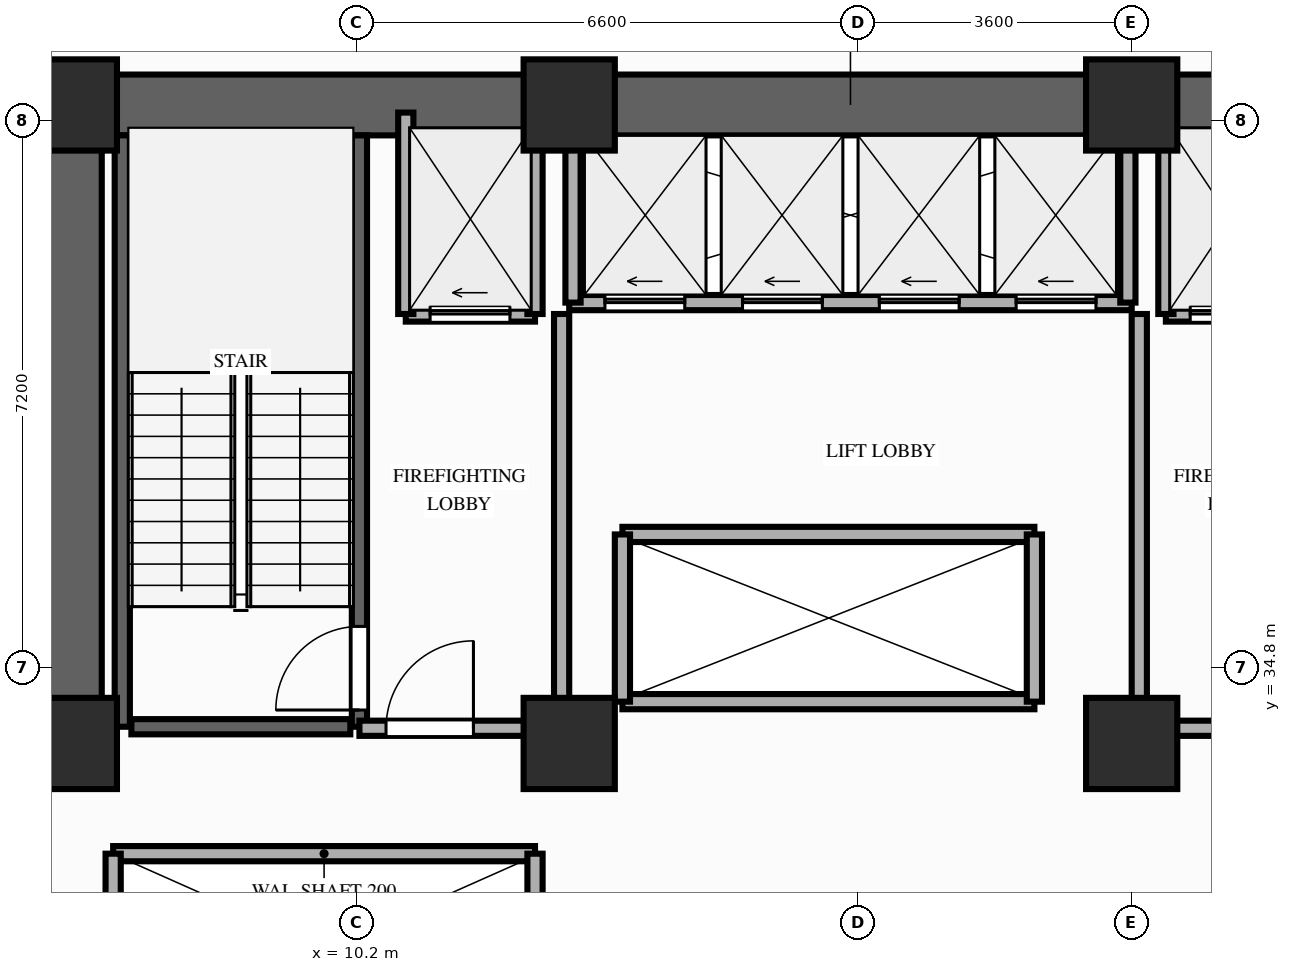
"""IFC4 building model, lengths in metres.
Left out: names, types, materials, properties, quantities, classifications, styles, units other than length and angle.
Written with IfcOpenShell. Run it as: python <this file> out.ifc"""

import sys

from ifc_helpers import new_model, si_unit, direction, frame, frame_2d, origin, origin_2d, place, context, subcontext, project, spatial, rectangle, extrude, element, fill, save


model = new_model("IFC4")
c1 = context("Model", 3, precision=1e-05, world=origin(), true_north=direction((0.0, 1.0)))
c2 = subcontext(c1, "Body", "Model", "MODEL_VIEW")
j1 = project(units=[si_unit("LENGTHUNIT", "METRE"), si_unit("PLANEANGLEUNIT", "RADIAN")], contexts=[c1])
p1 = place(None, origin())
s1 = spatial("IfcSite", under=j1, at=p1, CompositionType="ELEMENT")
p2 = place(p1, origin())
s2 = spatial("IfcBuilding", under=s1, at=p2, CompositionType="ELEMENT")
p3 = place(p2, frame((0.0, 0.0, 4.6)))
s3 = spatial("IfcBuildingStorey", under=s2, at=p3, CompositionType="ELEMENT", Elevation=4.6)
for number, where, z_axis, x_axis in (
    (1, (6.45, 33.8, 0.0), (0.0, 0.0, 1.0), (1.0, 0.0, 0.0)),
    (2, (13.0, 33.8, 0.0), (0.0, 0.0, 1.0), (1.0, 0.0, 0.0)),
    (3, (20.4, 33.8, 0.0), (0.0, 0.0, 1.0), (1.0, 0.0, 0.0)),
    (4, (6.45, 42.2, 0.0), (0.0, 0.0, 1.0), (1.0, 0.0, 0.0)),
    (5, (13.0, 42.2, 0.0), (0.0, 0.0, 1.0), (1.0, 0.0, 0.0)),
    (6, (20.4, 42.2, 0.0), (0.0, 0.0, 1.0), (1.0, 0.0, 0.0)),
):
    element("IfcColumn", number, at=place(p3, frame(where, z_axis=z_axis, x_axis=x_axis)), inside=s3, PredefinedType="COLUMN", context=c2, shape_type="SweptSolid", body=[
        extrude(rectangle(XDim=1.2, YDim=1.2, at=origin_2d()), origin(), (0.0, 0.0, 1.0), 4.2),
    ])
p4 = place(p3, frame((6.45, 42.2, 0.0), z_axis=(0.0, 0.0, 1.0), x_axis=(1.0, 0.0, 0.0)))
e7 = element("IfcWall", 7, at=p4, inside=s3, PredefinedType="SHEAR", context=c2, shape_type="SweptSolid", body=[
    extrude(rectangle(XDim=20.45, YDim=0.8, at=frame_2d((10.225, 0.0))), origin(), (0.0, 0.0, 1.0), 3.95),
])
p5 = place(p3, frame((6.45, 33.8, 0.0), z_axis=(0.0, 0.0, 1.0), x_axis=(0.0, 1.0, 0.0)))
e8 = element("IfcWall", 8, at=p5, inside=s3, PredefinedType="SHEAR", context=c2, shape_type="SweptSolid", body=[
    extrude(rectangle(XDim=7.95, YDim=0.8, at=frame_2d((3.975, 0.0))), origin(), (0.0, 0.0, 1.0), 3.95),
])
p6 = place(p3, frame((7.12, 34.02, 0.0), z_axis=(0.0, 0.0, 1.0), x_axis=(0.0, 1.0, 0.0)))
e9 = element("IfcWall", 9, at=p6, inside=s3, PredefinedType="SHEAR", context=c2, shape_type="SweptSolid", body=[
    extrude(rectangle(XDim=7.78, YDim=0.2, at=frame_2d((3.89, 0.0))), origin(), (0.0, 0.0, 1.0), 3.95),
])
p7 = place(p3, frame((10.24, 34.02, 0.0), z_axis=(0.0, 0.0, 1.0), x_axis=(0.0, 1.0, 0.0)))
e10 = element("IfcWall", 10, at=p7, inside=s3, PredefinedType="SHEAR", context=c2, shape_type="SweptSolid", body=[
    extrude(rectangle(XDim=7.78, YDim=0.2, at=frame_2d((3.89, 0.0))), origin(), (0.0, 0.0, 1.0), 3.95),
])
p8 = place(p7, frame((0.22, 0.0, 0.0)))
e11 = element("IfcOpeningElement", 11, at=p8, cuts=e10, PredefinedType="OPENING", context=c2, shape_type="SweptSolid", body=[
    extrude(rectangle(XDim=1.1, YDim=2.15, at=frame_2d((0.55, 1.075))), frame((0.0, 0.11, 0.0), z_axis=(0.0, -1.0, 0.0), x_axis=(1.0, 0.0, 0.0)), (0.0, 0.0, 1.0), 0.22),
])
p9 = place(p3, frame((7.24, 34.02, 0.0), z_axis=(0.0, 0.0, 1.0), x_axis=(1.0, 0.0, 0.0)))
e12 = element("IfcWall", 12, at=p9, inside=s3, PredefinedType="SHEAR", context=c2, shape_type="SweptSolid", body=[
    extrude(rectangle(XDim=2.88, YDim=0.2, at=frame_2d((1.44, 0.0))), origin(), (0.0, 0.0, 1.0), 3.95),
])
p10 = place(p3, frame((7.0, 32.35, 0.0), z_axis=(0.0, 0.0, 1.0), x_axis=(1.0, 0.0, 0.0)))
e13 = element("IfcWall", 13, at=p10, inside=s3, PredefinedType="MOVABLE", context=c2, shape_type="SweptSolid", body=[
    extrude(rectangle(XDim=5.55, YDim=0.2, at=frame_2d((2.775, 0.0))), origin(), (0.0, 0.0, 1.0), 3.95),
])
for number, where, z_axis, x_axis in (
    (14, (7.0, 29.85, 0.0), (0.0, 0.0, 1.0), (0.0, 1.0, 0.0)),
    (15, (12.55, 29.85, 0.0), (0.0, 0.0, 1.0), (0.0, 1.0, 0.0)),
):
    element("IfcWall", number, at=place(p3, frame(where, z_axis=z_axis, x_axis=x_axis)), inside=s3, PredefinedType="MOVABLE", context=c2, shape_type="SweptSolid", body=[
        extrude(rectangle(XDim=2.5, YDim=0.2, at=frame_2d((1.25, 0.0))), origin(), (0.0, 0.0, 1.0), 3.95),
    ])
p11 = place(p3, frame((10.85, 39.45, 0.0), z_axis=(0.0, 0.0, 1.0), x_axis=(1.0, 0.0, 0.0)))
e16 = element("IfcWall", 16, at=p11, inside=s3, PredefinedType="MOVABLE", context=c2, shape_type="SweptSolid", body=[
    extrude(rectangle(XDim=1.7, YDim=0.2, at=frame_2d((0.85, 0.0))), origin(), (0.0, 0.0, 1.0), 3.95),
])
p12 = place(p11, frame((0.32, 0.0, 0.0)))
e17 = element("IfcOpeningElement", 17, at=p12, cuts=e16, PredefinedType="OPENING", context=c2, shape_type="SweptSolid", body=[
    extrude(rectangle(XDim=1.05, YDim=2.15, at=frame_2d((0.525, 1.075))), frame((0.0, 0.11, 0.0), z_axis=(0.0, -1.0, 0.0), x_axis=(1.0, 0.0, 0.0)), (0.0, 0.0, 1.0), 0.22),
])
p13 = place(p3, frame((20.85, 39.45, 0.0), z_axis=(0.0, 0.0, 1.0), x_axis=(1.0, 0.0, 0.0)))
e18 = element("IfcWall", 18, at=p13, inside=s3, PredefinedType="MOVABLE", context=c2, shape_type="SweptSolid", body=[
    extrude(rectangle(XDim=1.7, YDim=0.2, at=frame_2d((0.85, 0.0))), origin(), (0.0, 0.0, 1.0), 3.95),
])
p14 = place(p13, frame((0.32, 0.0, 0.0)))
e19 = element("IfcOpeningElement", 19, at=p14, cuts=e18, PredefinedType="OPENING", context=c2, shape_type="SweptSolid", body=[
    extrude(rectangle(XDim=1.05, YDim=2.15, at=frame_2d((0.525, 1.075))), frame((0.0, 0.11, 0.0), z_axis=(0.0, -1.0, 0.0), x_axis=(1.0, 0.0, 0.0)), (0.0, 0.0, 1.0), 0.22),
])
for number, where, z_axis, x_axis in (
    (20, (10.85, 39.45, 0.0), (0.0, 0.0, 1.0), (0.0, 1.0, 0.0)),
    (21, (12.55, 39.45, 0.0), (0.0, 0.0, 1.0), (0.0, 1.0, 0.0)),
):
    element("IfcWall", number, at=place(p3, frame(where, z_axis=z_axis, x_axis=x_axis)), inside=s3, PredefinedType="MOVABLE", context=c2, shape_type="SweptSolid", body=[
        extrude(rectangle(XDim=2.65, YDim=0.2, at=frame_2d((1.325, 0.0))), origin(), (0.0, 0.0, 1.0), 3.95),
    ])
p15 = place(p3, frame((12.9, 34.0, 0.0), z_axis=(0.0, 0.0, 1.0), x_axis=(0.0, 1.0, 0.0)))
e22 = element("IfcWall", 22, at=p15, inside=s3, PredefinedType="PARTITIONING", context=c2, shape_type="SweptSolid", body=[
    extrude(rectangle(XDim=5.45, YDim=0.2, at=frame_2d((2.725, 0.0))), origin(), (0.0, 0.0, 1.0), 3.23),
])
p16 = place(p3, frame((10.24, 34.0, 0.0), z_axis=(0.0, 0.0, 1.0), x_axis=(1.0, 0.0, 0.0)))
e23 = element("IfcWall", 23, at=p16, inside=s3, PredefinedType="PARTITIONING", context=c2, shape_type="SweptSolid", body=[
    extrude(rectangle(XDim=2.66, YDim=0.2, at=frame_2d((1.33, 0.0))), origin(), (0.0, 0.0, 1.0), 3.23),
])
p17 = place(p16, frame((0.35, 0.0, 0.0)))
e24 = element("IfcOpeningElement", 24, at=p17, cuts=e23, PredefinedType="OPENING", context=c2, shape_type="SweptSolid", body=[
    extrude(rectangle(XDim=1.15, YDim=2.15, at=frame_2d((0.575, 1.075))), frame((0.0, 0.11, 0.0), z_axis=(0.0, -1.0, 0.0), x_axis=(1.0, 0.0, 0.0)), (0.0, 0.0, 1.0), 0.22),
])
p18 = place(p3, frame((20.85, 39.45, 0.0), z_axis=(0.0, 0.0, 1.0), x_axis=(0.0, 1.0, 0.0)))
e25 = element("IfcWall", 25, at=p18, inside=s3, PredefinedType="MOVABLE", context=c2, shape_type="SweptSolid", body=[
    extrude(rectangle(XDim=2.65, YDim=0.2, at=frame_2d((1.325, 0.0))), origin(), (0.0, 0.0, 1.0), 3.95),
])
p19 = place(p3, frame((20.5, 34.0, 0.0), z_axis=(0.0, 0.0, 1.0), x_axis=(0.0, 1.0, 0.0)))
e26 = element("IfcWall", 26, at=p19, inside=s3, PredefinedType="PARTITIONING", context=c2, shape_type="SweptSolid", body=[
    extrude(rectangle(XDim=5.45, YDim=0.2, at=frame_2d((2.725, 0.0))), origin(), (0.0, 0.0, 1.0), 3.23),
])
p20 = place(p3, frame((20.5, 34.0, 0.0), z_axis=(0.0, 0.0, 1.0), x_axis=(1.0, 0.0, 0.0)))
e27 = element("IfcWall", 27, at=p20, inside=s3, PredefinedType="PARTITIONING", context=c2, shape_type="SweptSolid", body=[
    extrude(rectangle(XDim=2.6, YDim=0.2, at=frame_2d((1.3, 0.0))), origin(), (0.0, 0.0, 1.0), 3.23),
])
p21 = place(p20, frame((1.05, 0.0, 0.0)))
e28 = element("IfcOpeningElement", 28, at=p21, cuts=e27, PredefinedType="OPENING", context=c2, shape_type="SweptSolid", body=[
    extrude(rectangle(XDim=1.15, YDim=2.15, at=frame_2d((0.575, 1.075))), frame((0.0, 0.11, 0.0), z_axis=(0.0, -1.0, 0.0), x_axis=(1.0, 0.0, 0.0)), (0.0, 0.0, 1.0), 0.22),
])
p22 = place(p3, frame((13.0, 39.6, 0.0), z_axis=(0.0, 0.0, 1.0), x_axis=(1.0, 0.0, 0.0)))
e29 = element("IfcWall", 29, at=p22, inside=s3, PredefinedType="MOVABLE", context=c2, shape_type="SweptSolid", body=[
    extrude(rectangle(XDim=7.4, YDim=0.2, at=frame_2d((3.7, 0.0))), origin(), (0.0, 0.0, 1.0), 3.95),
])
p23 = place(p22, frame((0.47, 0.0, 0.0)))
e30 = element("IfcOpeningElement", 30, at=p23, cuts=e29, PredefinedType="OPENING", context=c2, shape_type="SweptSolid", body=[
    extrude(rectangle(XDim=1.05, YDim=2.15, at=frame_2d((0.525, 1.075))), frame((0.0, 0.11, 0.0), z_axis=(0.0, -1.0, 0.0), x_axis=(1.0, 0.0, 0.0)), (0.0, 0.0, 1.0), 0.22),
])
p24 = place(p22, frame((2.28, 0.0, 0.0)))
e31 = element("IfcOpeningElement", 31, at=p24, cuts=e29, PredefinedType="OPENING", context=c2, shape_type="SweptSolid", body=[
    extrude(rectangle(XDim=1.05, YDim=2.15, at=frame_2d((0.525, 1.075))), frame((0.0, 0.11, 0.0), z_axis=(0.0, -1.0, 0.0), x_axis=(1.0, 0.0, 0.0)), (0.0, 0.0, 1.0), 0.22),
])
p25 = place(p22, frame((4.08, 0.0, 0.0)))
e32 = element("IfcOpeningElement", 32, at=p25, cuts=e29, PredefinedType="OPENING", context=c2, shape_type="SweptSolid", body=[
    extrude(rectangle(XDim=1.05, YDim=2.15, at=frame_2d((0.525, 1.075))), frame((0.0, 0.11, 0.0), z_axis=(0.0, -1.0, 0.0), x_axis=(1.0, 0.0, 0.0)), (0.0, 0.0, 1.0), 0.22),
])
p26 = place(p22, frame((5.88, 0.0, 0.0)))
e33 = element("IfcOpeningElement", 33, at=p26, cuts=e29, PredefinedType="OPENING", context=c2, shape_type="SweptSolid", body=[
    extrude(rectangle(XDim=1.05, YDim=2.15, at=frame_2d((0.525, 1.075))), frame((0.0, 0.11, 0.0), z_axis=(0.0, -1.0, 0.0), x_axis=(1.0, 0.0, 0.0)), (0.0, 0.0, 1.0), 0.22),
])
for number, where, z_axis, x_axis in (
    (34, (13.05, 39.6, 0.0), (0.0, 0.0, 1.0), (0.0, 1.0, 0.0)),
    (35, (20.35, 39.6, 0.0), (0.0, 0.0, 1.0), (0.0, 1.0, 0.0)),
):
    element("IfcWall", number, at=place(p3, frame(where, z_axis=z_axis, x_axis=x_axis)), inside=s3, PredefinedType="MOVABLE", context=c2, shape_type="SweptSolid", body=[
        extrude(rectangle(XDim=2.18, YDim=0.2, at=frame_2d((1.09, 0.0))), origin(), (0.0, 0.0, 1.0), 3.95),
    ])
for number, where, z_axis, x_axis in (
    (36, (13.7, 34.35, 0.0), (0.0, 0.0, 1.0), (1.0, 0.0, 0.0)),
    (37, (13.7, 36.55, 0.0), (0.0, 0.0, 1.0), (1.0, 0.0, 0.0)),
):
    element("IfcWall", number, at=place(p3, frame(where, z_axis=z_axis, x_axis=x_axis)), inside=s3, PredefinedType="MOVABLE", context=c2, shape_type="SweptSolid", body=[
        extrude(rectangle(XDim=5.42, YDim=0.2, at=frame_2d((2.71, 0.0))), origin(), (0.0, 0.0, 1.0), 3.95),
    ])
for number, where, z_axis, x_axis in (
    (38, (13.7, 34.35, 0.0), (0.0, 0.0, 1.0), (0.0, 1.0, 0.0)),
    (39, (19.12, 34.35, 0.0), (0.0, 0.0, 1.0), (0.0, 1.0, 0.0)),
):
    element("IfcWall", number, at=place(p3, frame(where, z_axis=z_axis, x_axis=x_axis)), inside=s3, PredefinedType="MOVABLE", context=c2, shape_type="SweptSolid", body=[
        extrude(rectangle(XDim=2.2, YDim=0.2, at=frame_2d((1.1, 0.0))), origin(), (0.0, 0.0, 1.0), 3.95),
    ])
p27 = place(p8, origin())
e40 = element("IfcDoor", 40, at=p27, inside=s3, OperationType="SINGLE_SWING_LEFT", PredefinedType="DOOR", context=c2, shape_type="SweptSolid", body=[
    extrude(rectangle(XDim=1.1, YDim=2.15, at=frame_2d((0.55, 1.075))), frame((0.0, 0.025, 0.0), z_axis=(0.0, -1.0, 0.0), x_axis=(1.0, 0.0, 0.0)), (0.0, 0.0, 1.0), 0.05),
])
fill(e11, e40)
p28 = place(p12, origin())
e41 = element("IfcDoor", 41, at=p28, inside=s3, OperationType="SLIDING_TO_LEFT", PredefinedType="DOOR", context=c2, shape_type="SweptSolid", body=[
    extrude(rectangle(XDim=1.05, YDim=2.15, at=frame_2d((0.525, 1.075))), frame((0.0, 0.025, 0.0), z_axis=(0.0, -1.0, 0.0), x_axis=(1.0, 0.0, 0.0)), (0.0, 0.0, 1.0), 0.05),
])
fill(e17, e41)
p29 = place(p14, origin())
e42 = element("IfcDoor", 42, at=p29, inside=s3, OperationType="SLIDING_TO_LEFT", PredefinedType="DOOR", context=c2, shape_type="SweptSolid", body=[
    extrude(rectangle(XDim=1.05, YDim=2.15, at=frame_2d((0.525, 1.075))), frame((0.0, 0.025, 0.0), z_axis=(0.0, -1.0, 0.0), x_axis=(1.0, 0.0, 0.0)), (0.0, 0.0, 1.0), 0.05),
])
fill(e19, e42)
p30 = place(p17, origin())
e43 = element("IfcDoor", 43, at=p30, inside=s3, OperationType="SINGLE_SWING_RIGHT", PredefinedType="DOOR", context=c2, shape_type="SweptSolid", body=[
    extrude(rectangle(XDim=1.15, YDim=2.15, at=frame_2d((0.575, 1.075))), frame((0.0, 0.025, 0.0), z_axis=(0.0, -1.0, 0.0), x_axis=(1.0, 0.0, 0.0)), (0.0, 0.0, 1.0), 0.05),
])
fill(e24, e43)
p31 = place(p23, origin())
e44 = element("IfcDoor", 44, at=p31, inside=s3, OperationType="SLIDING_TO_LEFT", PredefinedType="DOOR", context=c2, shape_type="SweptSolid", body=[
    extrude(rectangle(XDim=1.05, YDim=2.15, at=frame_2d((0.525, 1.075))), frame((0.0, 0.025, 0.0), z_axis=(0.0, -1.0, 0.0), x_axis=(1.0, 0.0, 0.0)), (0.0, 0.0, 1.0), 0.05),
])
fill(e30, e44)
p32 = place(p24, origin())
e45 = element("IfcDoor", 45, at=p32, inside=s3, OperationType="SLIDING_TO_LEFT", PredefinedType="DOOR", context=c2, shape_type="SweptSolid", body=[
    extrude(rectangle(XDim=1.05, YDim=2.15, at=frame_2d((0.525, 1.075))), frame((0.0, 0.025, 0.0), z_axis=(0.0, -1.0, 0.0), x_axis=(1.0, 0.0, 0.0)), (0.0, 0.0, 1.0), 0.05),
])
fill(e31, e45)
p33 = place(p25, origin())
e46 = element("IfcDoor", 46, at=p33, inside=s3, OperationType="SLIDING_TO_LEFT", PredefinedType="DOOR", context=c2, shape_type="SweptSolid", body=[
    extrude(rectangle(XDim=1.05, YDim=2.15, at=frame_2d((0.525, 1.075))), frame((0.0, 0.025, 0.0), z_axis=(0.0, -1.0, 0.0), x_axis=(1.0, 0.0, 0.0)), (0.0, 0.0, 1.0), 0.05),
])
fill(e32, e46)
p34 = place(p26, origin())
e47 = element("IfcDoor", 47, at=p34, inside=s3, OperationType="SLIDING_TO_LEFT", PredefinedType="DOOR", context=c2, shape_type="SweptSolid", body=[
    extrude(rectangle(XDim=1.05, YDim=2.15, at=frame_2d((0.525, 1.075))), frame((0.0, 0.025, 0.0), z_axis=(0.0, -1.0, 0.0), x_axis=(1.0, 0.0, 0.0)), (0.0, 0.0, 1.0), 0.05),
])
fill(e33, e47)
save(model, sys.argv[1])
